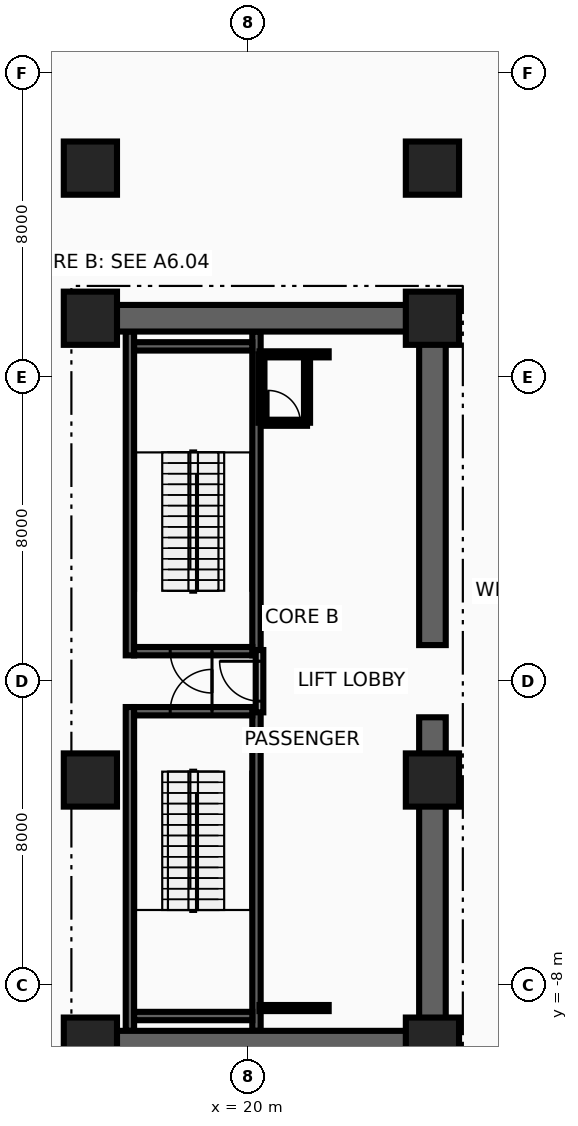
"""IFC4 building model, lengths in metres.
Left out: names, types, materials, properties, quantities, classifications, styles, units other than length and angle.
Written with IfcOpenShell. Run it as: python <this file> out.ifc"""

import sys

from ifc_helpers import new_model, si_unit, direction, frame, frame_2d, origin, origin_2d, place, context, subcontext, project, spatial, rectangle, extrude, source, transform, mapped, element, fill, save


model = new_model("IFC4")
c1 = context("Model", 3, precision=1e-05, world=origin(), true_north=direction((0.0, 1.0)))
c2 = subcontext(c1, "Body", "Model", "MODEL_VIEW")
j1 = project(units=[si_unit("LENGTHUNIT", "METRE"), si_unit("PLANEANGLEUNIT", "RADIAN")], contexts=[c1])
p1 = place(None, origin())
s1 = spatial("IfcSite", under=j1, at=p1, CompositionType="ELEMENT")
p2 = place(p1, origin())
s2 = spatial("IfcBuilding", under=s1, at=p2, CompositionType="ELEMENT")
p3 = place(p2, frame((0.0, 0.0, -9.6)))
s3 = spatial("IfcBuildingStorey", under=s2, at=p3, CompositionType="ELEMENT", Elevation=-9.6)
for number, where, z_axis, x_axis in (
    (1, (16.89, 0.68, 0.0), (0.0, 0.0, 1.0), (0.0, 1.0, 0.0)),
    (2, (20.22, 0.68, 0.0), (0.0, 0.0, 1.0), (0.0, 1.0, 0.0)),
):
    element("IfcWall", number, at=place(p3, frame(where, z_axis=z_axis, x_axis=x_axis)), inside=s3, PredefinedType="SHEAR", context=c2, shape_type="SweptSolid", body=[
        extrude(rectangle(XDim=8.52, YDim=0.22, at=frame_2d((4.26, 0.0))), origin(), (0.0, 0.0, 1.0), 4.54),
    ])
p4 = place(p3, frame((17.0, 0.79, 0.0), z_axis=(0.0, 0.0, 1.0), x_axis=(1.0, 0.0, 0.0)))
e3 = element("IfcWall", 3, at=p4, inside=s3, PredefinedType="SHEAR", context=c2, shape_type="SweptSolid", body=[
    extrude(rectangle(XDim=3.11, YDim=0.22, at=frame_2d((1.555, 0.0))), origin(), (0.0, 0.0, 1.0), 4.54),
])
p5 = place(p4, frame((0.95, 0.0, 0.0)))
e4 = element("IfcOpeningElement", 4, at=p5, cuts=e3, PredefinedType="OPENING", context=c2, shape_type="SweptSolid", body=[
    extrude(rectangle(XDim=1.1, YDim=2.15, at=frame_2d((0.55, 1.075))), frame((0.0, 0.125, 0.0), z_axis=(0.0, -1.0, 0.0), x_axis=(1.0, 0.0, 0.0)), (0.0, 0.0, 1.0), 0.25),
])
p6 = place(p3, frame((17.0, 8.81, 0.0), z_axis=(0.0, 0.0, 1.0), x_axis=(1.0, 0.0, 0.0)))
e5 = element("IfcWall", 5, at=p6, inside=s3, PredefinedType="SHEAR", context=c2, shape_type="SweptSolid", body=[
    extrude(rectangle(XDim=3.11, YDim=0.22, at=frame_2d((1.555, 0.0))), origin(), (0.0, 0.0, 1.0), 4.54),
])
for number, where, z_axis, x_axis in (
    (6, (16.89, -9.2, 0.0), (0.0, 0.0, 1.0), (0.0, 1.0, 0.0)),
    (7, (20.22, -9.2, 0.0), (0.0, 0.0, 1.0), (0.0, 1.0, 0.0)),
):
    element("IfcWall", number, at=place(p3, frame(where, z_axis=z_axis, x_axis=x_axis)), inside=s3, PredefinedType="SHEAR", context=c2, shape_type="SweptSolid", body=[
        extrude(rectangle(XDim=8.52, YDim=0.22, at=frame_2d((4.26, 0.0))), origin(), (0.0, 0.0, 1.0), 4.54),
    ])
p7 = place(p3, frame((17.0, -8.81, 0.0), z_axis=(0.0, 0.0, 1.0), x_axis=(1.0, 0.0, 0.0)))
e8 = element("IfcWall", 8, at=p7, inside=s3, PredefinedType="SHEAR", context=c2, shape_type="SweptSolid", body=[
    extrude(rectangle(XDim=3.11, YDim=0.22, at=frame_2d((1.555, 0.0))), origin(), (0.0, 0.0, 1.0), 4.54),
])
p8 = place(p3, frame((17.0, -0.79, 0.0), z_axis=(0.0, 0.0, 1.0), x_axis=(1.0, 0.0, 0.0)))
e9 = element("IfcWall", 9, at=p8, inside=s3, PredefinedType="SHEAR", context=c2, shape_type="SweptSolid", body=[
    extrude(rectangle(XDim=3.11, YDim=0.22, at=frame_2d((1.555, 0.0))), origin(), (0.0, 0.0, 1.0), 4.54),
])
p9 = place(p8, frame((0.95, 0.0, 0.0)))
e10 = element("IfcOpeningElement", 10, at=p9, cuts=e9, PredefinedType="OPENING", context=c2, shape_type="SweptSolid", body=[
    extrude(rectangle(XDim=1.1, YDim=2.15, at=frame_2d((0.55, 1.075))), frame((0.0, 0.125, 0.0), z_axis=(0.0, -1.0, 0.0), x_axis=(1.0, 0.0, 0.0)), (0.0, 0.0, 1.0), 0.25),
])
for number, where, z_axis, x_axis in (
    (11, (24.85, -9.9, 0.0), (0.0, 0.0, 1.0), (0.0, 1.0, 0.0)),
    (12, (24.85, 0.95, 0.0), (0.0, 0.0, 1.0), (0.0, 1.0, 0.0)),
):
    element("IfcWall", number, at=place(p3, frame(where, z_axis=z_axis, x_axis=x_axis)), inside=s3, PredefinedType="SHEAR", context=c2, shape_type="SweptSolid", body=[
        extrude(rectangle(XDim=8.95, YDim=0.7, at=frame_2d((4.475, 0.0))), origin(), (0.0, 0.0, 1.0), 4.54),
    ])
for number, where, z_axis, x_axis in (
    (13, (15.85, 9.55, 0.0), (0.0, 0.0, 1.0), (1.0, 0.0, 0.0)),
    (14, (15.85, -9.55, 0.0), (0.0, 0.0, 1.0), (1.0, 0.0, 0.0)),
):
    element("IfcWall", number, at=place(p3, frame(where, z_axis=z_axis, x_axis=x_axis)), inside=s3, PredefinedType="SHEAR", context=c2, shape_type="SweptSolid", body=[
        extrude(rectangle(XDim=9.0, YDim=0.7, at=frame_2d((4.5, 0.0))), origin(), (0.0, 0.0, 1.0), 4.54),
    ])
m1 = source(origin(), c2, "Body", "SweptSolid", [
    extrude(rectangle(XDim=1.4, YDim=1.4, at=origin_2d()), origin(), (0.0, 0.0, 1.0), 4.8),
])
for number, where, z_axis, x_axis in (
    (15, (15.85, -9.55, 0.0), (0.0, 0.0, 1.0), (1.0, 0.0, 0.0)),
    (16, (24.85, -9.55, 0.0), (0.0, 0.0, 1.0), (1.0, 0.0, 0.0)),
    (17, (15.85, -2.6, 0.0), (0.0, 0.0, 1.0), (1.0, 0.0, 0.0)),
    (18, (24.85, -2.6, 0.0), (0.0, 0.0, 1.0), (1.0, 0.0, 0.0)),
    (19, (15.85, 9.55, 0.0), (0.0, 0.0, 1.0), (1.0, 0.0, 0.0)),
    (20, (24.85, 9.55, 0.0), (0.0, 0.0, 1.0), (1.0, 0.0, 0.0)),
    (21, (15.85, 13.5, 0.0), (0.0, 0.0, 1.0), (1.0, 0.0, 0.0)),
    (22, (24.85, 13.5, 0.0), (0.0, 0.0, 1.0), (1.0, 0.0, 0.0)),
):
    element("IfcColumn", number, at=place(p3, frame(where, z_axis=z_axis, x_axis=x_axis)), inside=s3, PredefinedType="COLUMN", context=c2, shape_type="MappedRepresentation", body=[
        mapped(m1, transform((0.0, 0.0, 0.0), x_axis=(1.0, 0.0, 0.0), y_axis=(0.0, 1.0, 0.0), z_axis=(0.0, 0.0, 1.0), scale=1.0)),
    ])
p10 = place(p3, frame((20.3, -0.82, 0.0), z_axis=(0.0, 0.0, 1.0), x_axis=(0.0, 1.0, 0.0)))
e23 = element("IfcWall", 23, at=p10, inside=s3, PredefinedType="PARTITIONING", context=c2, shape_type="SweptSolid", body=[
    extrude(rectangle(XDim=1.64, YDim=0.2, at=frame_2d((0.82, 0.0))), origin(), (0.0, 0.0, 1.0), 4.54),
])
p11 = place(p10, frame((0.295, 0.0, 0.0)))
e24 = element("IfcOpeningElement", 24, at=p11, cuts=e23, PredefinedType="OPENING", context=c2, shape_type="SweptSolid", body=[
    extrude(rectangle(XDim=1.05, YDim=2.15, at=frame_2d((0.525, 1.075))), frame((0.0, 0.115, 0.0), z_axis=(0.0, -1.0, 0.0), x_axis=(1.0, 0.0, 0.0)), (0.0, 0.0, 1.0), 0.23),
])
p12 = place(p3, frame((20.35, 6.8, 0.0), z_axis=(0.0, 0.0, 1.0), x_axis=(1.0, 0.0, 0.0)))
e25 = element("IfcWall", 25, at=p12, inside=s3, PredefinedType="PARTITIONING", context=c2, shape_type="SweptSolid", body=[
    extrude(rectangle(XDim=1.2, YDim=0.16, at=frame_2d((0.6, 0.0))), origin(), (0.0, 0.0, 1.0), 4.54),
])
p13 = place(p12, frame((0.175, 0.0, 0.0)))
e26 = element("IfcOpeningElement", 26, at=p13, cuts=e25, PredefinedType="OPENING", context=c2, shape_type="SweptSolid", body=[
    extrude(rectangle(XDim=0.85, YDim=2.05, at=frame_2d((0.425, 1.025))), frame((0.0, 0.095, 0.0), z_axis=(0.0, -1.0, 0.0), x_axis=(1.0, 0.0, 0.0)), (0.0, 0.0, 1.0), 0.19),
])
for number, where, z_axis, x_axis in (
    (27, (21.55, 6.8, 0.0), (0.0, 0.0, 1.0), (0.0, 1.0, 0.0)),
    (28, (20.35, 6.8, 0.0), (0.0, 0.0, 1.0), (0.0, 1.0, 0.0)),
):
    element("IfcWall", number, at=place(p3, frame(where, z_axis=z_axis, x_axis=x_axis)), inside=s3, PredefinedType="PARTITIONING", context=c2, shape_type="SweptSolid", body=[
        extrude(rectangle(XDim=1.8, YDim=0.16, at=frame_2d((0.9, 0.0))), origin(), (0.0, 0.0, 1.0), 4.54),
    ])
for number, where, z_axis, x_axis in (
    (29, (20.3, -8.6, 0.0), (0.0, 0.0, 1.0), (1.0, 0.0, 0.0)),
    (30, (20.3, 8.6, 0.0), (0.0, 0.0, 1.0), (1.0, 0.0, 0.0)),
):
    element("IfcWall", number, at=place(p3, frame(where, z_axis=z_axis, x_axis=x_axis)), inside=s3, PredefinedType="PARTITIONING", context=c2, shape_type="SweptSolid", body=[
        extrude(rectangle(XDim=1.82, YDim=0.16, at=frame_2d((0.91, 0.0))), origin(), (0.0, 0.0, 1.0), 4.54),
    ])
p14 = place(p11, origin())
e31 = element("IfcDoor", 31, at=p14, inside=s3, OperationType="SINGLE_SWING_RIGHT", PredefinedType="DOOR", context=c2, shape_type="SweptSolid", body=[
    extrude(rectangle(XDim=1.05, YDim=2.15, at=frame_2d((0.525, 1.075))), frame((0.0, 0.025, 0.0), z_axis=(0.0, -1.0, 0.0), x_axis=(1.0, 0.0, 0.0)), (0.0, 0.0, 1.0), 0.05),
])
fill(e24, e31)
p15 = place(p5, frame((1.1, 0.0, 0.0), z_axis=(0.0, 0.0, 1.0), x_axis=(-1.0, 0.0, 0.0)))
e32 = element("IfcDoor", 32, at=p15, inside=s3, OperationType="SINGLE_SWING_LEFT", PredefinedType="DOOR", context=c2, shape_type="SweptSolid", body=[
    extrude(rectangle(XDim=1.1, YDim=2.15, at=frame_2d((0.55, 1.075))), frame((0.0, 0.025, 0.0), z_axis=(0.0, -1.0, 0.0), x_axis=(1.0, 0.0, 0.0)), (0.0, 0.0, 1.0), 0.05),
])
fill(e4, e32)
p16 = place(p9, origin())
e33 = element("IfcDoor", 33, at=p16, inside=s3, OperationType="SINGLE_SWING_RIGHT", PredefinedType="DOOR", context=c2, shape_type="SweptSolid", body=[
    extrude(rectangle(XDim=1.1, YDim=2.15, at=frame_2d((0.55, 1.075))), frame((0.0, 0.025, 0.0), z_axis=(0.0, -1.0, 0.0), x_axis=(1.0, 0.0, 0.0)), (0.0, 0.0, 1.0), 0.05),
])
fill(e10, e33)
p17 = place(p13, origin())
e34 = element("IfcDoor", 34, at=p17, inside=s3, OperationType="SINGLE_SWING_LEFT", PredefinedType="DOOR", context=c2, shape_type="SweptSolid", body=[
    extrude(rectangle(XDim=0.85, YDim=2.05, at=frame_2d((0.425, 1.025))), frame((0.0, 0.025, 0.0), z_axis=(0.0, -1.0, 0.0), x_axis=(1.0, 0.0, 0.0)), (0.0, 0.0, 1.0), 0.05),
])
fill(e26, e34)
save(model, sys.argv[1])
